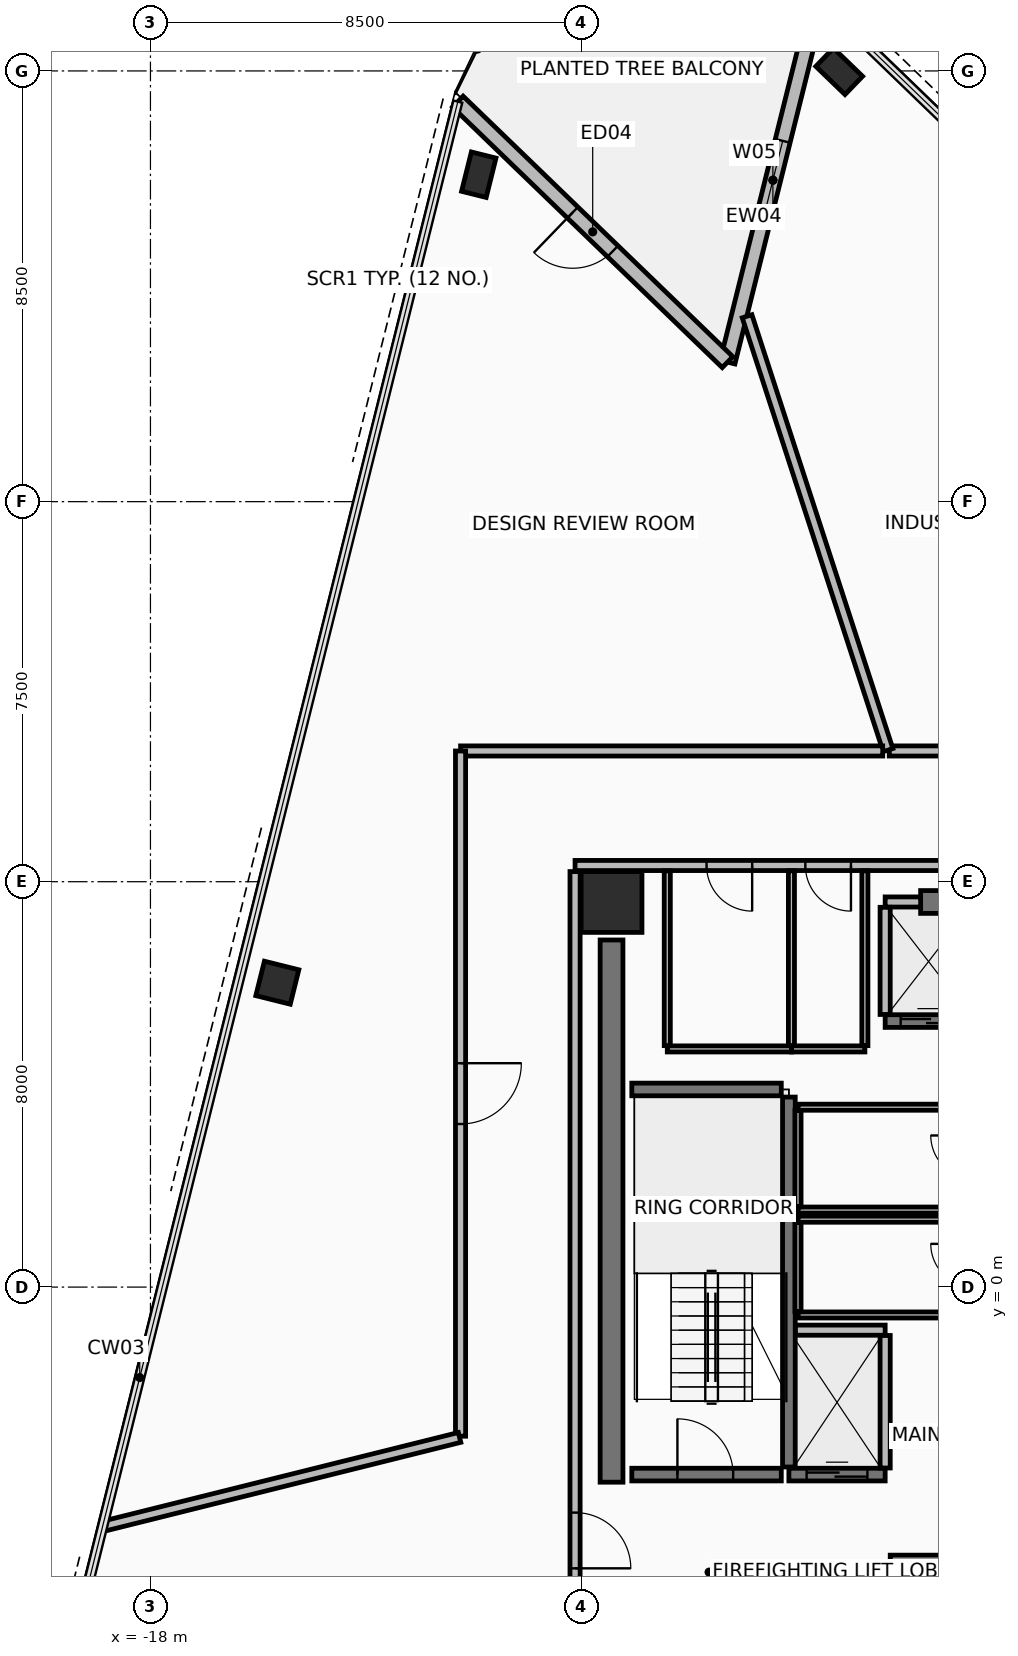
"""IFC4 building model, lengths in metres.
Left out: names, types, materials, properties, quantities, classifications, styles, units other than length and angle.
Written with IfcOpenShell. Run it as: python <this file> out.ifc"""

import sys

from ifc_helpers import new_model, si_unit, direction, frame, frame_2d, origin, origin_2d, place, context, subcontext, project, spatial, rectangle, hollow_rectangle, extrude, element, fill, save


model = new_model("IFC4")
c1 = context("Model", 3, precision=1e-05, world=origin(), true_north=direction((0.0, 1.0)))
c2 = subcontext(c1, "Body", "Model", "MODEL_VIEW")
j1 = project(units=[si_unit("LENGTHUNIT", "METRE"), si_unit("PLANEANGLEUNIT", "RADIAN")], contexts=[c1])
p1 = place(None, origin())
s1 = spatial("IfcSite", under=j1, at=p1, CompositionType="ELEMENT")
p2 = place(p1, origin())
s2 = spatial("IfcBuilding", under=s1, at=p2, CompositionType="ELEMENT")
p3 = place(p2, frame((0.0, 0.0, 100.5)))
s3 = spatial("IfcBuildingStorey", under=s2, at=p3, CompositionType="ELEMENT", Elevation=100.5)
p4 = place(p3, frame((-8.9, 7.6, 0.0), z_axis=(0.0, 0.0, 1.0), x_axis=(1.0, 0.0, 0.0)))
e1 = element("IfcColumn", 1, at=p4, inside=s3, PredefinedType="COLUMN", context=c2, shape_type="SweptSolid", body=[
    extrude(rectangle(XDim=1.2, YDim=1.2, at=origin_2d()), origin(), (0.0, 0.0, 1.0), 3.6),
])
p5 = place(p3, frame((-11.52, 21.952, 0.0), z_axis=(0.0, 0.0, 1.0), x_axis=(0.2419218956, 0.970295726276, 0.0)))
e2 = element("IfcColumn", 2, at=p5, inside=s3, PredefinedType="COLUMN", context=c2, shape_type="SweptSolid", body=[
    extrude(hollow_rectangle(XDim=0.5, YDim=0.8, WallThickness=0.04, at=origin_2d()), origin(), (0.0, 0.0, 1.0), 3.6),
])
p6 = place(p3, frame((-15.496, 6.007, 0.0), z_axis=(0.0, 0.0, 1.0), x_axis=(0.2419218956, 0.970295726276, 0.0)))
e3 = element("IfcColumn", 3, at=p6, inside=s3, PredefinedType="COLUMN", context=c2, shape_type="SweptSolid", body=[
    extrude(hollow_rectangle(XDim=0.7, YDim=0.7, WallThickness=0.04, at=origin_2d()), origin(), (0.0, 0.0, 1.0), 3.6),
])
p7 = place(p3, frame((-4.407, 23.992, 0.0), z_axis=(0.0, 0.0, 1.0), x_axis=(-0.719339800339, 0.694658370459, 0.0)))
e4 = element("IfcColumn", 4, at=p7, inside=s3, PredefinedType="COLUMN", context=c2, shape_type="SweptSolid", body=[
    extrude(hollow_rectangle(XDim=0.5, YDim=0.8, WallThickness=0.04, at=origin_2d()), origin(), (0.0, 0.0, 1.0), 3.6),
])
p8 = place(p3, frame((-4.82, 25.434, 0.0), z_axis=(0.0, 0.0, 1.0), x_axis=(-0.241930078207, -0.970293686086, 0.0)))
e5 = element("IfcWall", 5, at=p8, inside=s3, PredefinedType="STANDARD", context=c2, shape_type="SweptSolid", body=[
    extrude(rectangle(XDim=7.4, YDim=0.3, at=frame_2d((3.7, 0.0))), origin(), (0.0, 0.0, 1.0), 2.605),
])
p9 = place(p8, frame((2.9, 0.0, 0.25)))
e6 = element("IfcOpeningElement", 6, at=p9, cuts=e5, PredefinedType="OPENING", context=c2, shape_type="SweptSolid", body=[
    extrude(rectangle(XDim=1.6, YDim=2.2, at=frame_2d((0.8, 1.1))), frame((0.0, 0.16, 0.0), z_axis=(0.0, -1.0, 0.0), x_axis=(1.0, 0.0, 0.0)), (0.0, 0.0, 1.0), 0.32),
])
p10 = place(p3, frame((-6.611, 18.254, 0.0), z_axis=(0.0, 0.0, 1.0), x_axis=(-0.719321869339, 0.694676938073, 0.0)))
e7 = element("IfcWall", 7, at=p10, inside=s3, PredefinedType="STANDARD", context=c2, shape_type="SweptSolid", body=[
    extrude(rectangle(XDim=7.4, YDim=0.3, at=frame_2d((3.7, 0.0))), origin(), (0.0, 0.0, 1.0), 2.605),
])
p11 = place(p10, frame((3.15, 0.0, 0.0)))
e8 = element("IfcOpeningElement", 8, at=p11, cuts=e7, PredefinedType="OPENING", context=c2, shape_type="SweptSolid", body=[
    extrude(rectangle(XDim=1.1, YDim=2.2, at=frame_2d((0.55, 1.1))), frame((0.0, 0.16, 0.0), z_axis=(0.0, -1.0, 0.0), x_axis=(1.0, 0.0, 0.0)), (0.0, 0.0, 1.0), 0.32),
])
p12 = place(p3, frame((-2.8, 7.6, 0.0), z_axis=(0.0, 0.0, 1.0), x_axis=(1.0, 0.0, 0.0)))
e9 = element("IfcWall", 9, at=p12, inside=s3, PredefinedType="SHEAR", context=c2, shape_type="SweptSolid", body=[
    extrude(rectangle(XDim=5.38, YDim=0.45, at=frame_2d((2.69, 0.0))), origin(), (0.0, 0.0, 1.0), 3.41),
])
p13 = place(p3, frame((-8.9, -3.85, 0.0), z_axis=(0.0, 0.0, 1.0), x_axis=(0.0, 1.0, 0.0)))
e10 = element("IfcWall", 10, at=p13, inside=s3, PredefinedType="SHEAR", context=c2, shape_type="SweptSolid", body=[
    extrude(rectangle(XDim=10.7, YDim=0.45, at=frame_2d((5.35, 0.0))), origin(), (0.0, 0.0, 1.0), 3.41),
])
p14 = place(p3, frame((9.62, 8.32, 0.0), z_axis=(0.0, 0.0, 1.0), x_axis=(-1.0, 0.0, 0.0)))
e11 = element("IfcWall", 11, at=p14, inside=s3, PredefinedType="PARTITIONING", context=c2, shape_type="SweptSolid", body=[
    extrude(rectangle(XDim=19.24, YDim=0.2, at=frame_2d((9.62, 0.0))), origin(), (0.0, 0.0, 1.0), 2.755),
])
p15 = place(p14, frame((15.745, 0.0, 0.0)))
e12 = element("IfcOpeningElement", 12, at=p15, cuts=e11, PredefinedType="OPENING", context=c2, shape_type="SweptSolid", body=[
    extrude(rectangle(XDim=0.9, YDim=2.1, at=frame_2d((0.45, 1.05))), frame((0.0, 0.11, 0.0), z_axis=(0.0, -1.0, 0.0), x_axis=(1.0, 0.0, 0.0)), (0.0, 0.0, 1.0), 0.22),
])
p16 = place(p14, frame((13.795, 0.0, 0.0)))
e13 = element("IfcOpeningElement", 13, at=p16, cuts=e11, PredefinedType="OPENING", context=c2, shape_type="SweptSolid", body=[
    extrude(rectangle(XDim=0.9, YDim=2.1, at=frame_2d((0.45, 1.05))), frame((0.0, 0.11, 0.0), z_axis=(0.0, -1.0, 0.0), x_axis=(1.0, 0.0, 0.0)), (0.0, 0.0, 1.0), 0.22),
])
p17 = place(p3, frame((-9.62, 8.2, 0.0), z_axis=(0.0, 0.0, 1.0), x_axis=(0.0, -1.0, 0.0)))
e14 = element("IfcWall", 14, at=p17, inside=s3, PredefinedType="PARTITIONING", context=c2, shape_type="SweptSolid", body=[
    extrude(rectangle(XDim=16.4, YDim=0.2, at=frame_2d((8.2, 0.0))), origin(), (0.0, 0.0, 1.0), 2.805),
])
p18 = place(p17, frame((12.65, 0.0, 0.0)))
e15 = element("IfcOpeningElement", 15, at=p18, cuts=e14, PredefinedType="OPENING", context=c2, shape_type="SweptSolid", body=[
    extrude(rectangle(XDim=1.1, YDim=2.15, at=frame_2d((0.55, 1.075))), frame((0.0, 0.11, 0.0), z_axis=(0.0, -1.0, 0.0), x_axis=(1.0, 0.0, 0.0)), (0.0, 0.0, 1.0), 0.22),
])
p19 = place(p3, frame((-5.4, -3.55, 0.0), z_axis=(0.0, 0.0, 1.0), x_axis=(0.0, 1.0, 0.0)))
e16 = element("IfcWall", 16, at=p19, inside=s3, PredefinedType="SHEAR", context=c2, shape_type="SweptSolid", body=[
    extrude(rectangle(XDim=7.3, YDim=0.25, at=frame_2d((3.65, 0.0))), origin(), (0.0, 0.0, 1.0), 3.41),
])
p20 = place(p3, frame((-8.5, -3.7, 0.0), z_axis=(0.0, 0.0, 1.0), x_axis=(1.0, 0.0, 0.0)))
e17 = element("IfcWall", 17, at=p20, inside=s3, PredefinedType="SHEAR", context=c2, shape_type="SweptSolid", body=[
    extrude(rectangle(XDim=2.95, YDim=0.25, at=frame_2d((1.475, 0.0))), origin(), (0.0, 0.0, 1.0), 3.41),
])
p21 = place(p20, frame((0.9, 0.0, 0.0)))
e18 = element("IfcOpeningElement", 18, at=p21, cuts=e17, PredefinedType="OPENING", context=c2, shape_type="SweptSolid", body=[
    extrude(rectangle(XDim=1.1, YDim=2.15, at=frame_2d((0.55, 1.075))), frame((0.0, 0.135, 0.0), z_axis=(0.0, -1.0, 0.0), x_axis=(1.0, 0.0, 0.0)), (0.0, 0.0, 1.0), 0.27),
])
p22 = place(p3, frame((-8.5, 3.9, 0.0), z_axis=(0.0, 0.0, 1.0), x_axis=(1.0, 0.0, 0.0)))
e19 = element("IfcWall", 19, at=p22, inside=s3, PredefinedType="SHEAR", context=c2, shape_type="SweptSolid", body=[
    extrude(rectangle(XDim=2.95, YDim=0.25, at=frame_2d((1.475, 0.0))), origin(), (0.0, 0.0, 1.0), 3.41),
])
p23 = place(p3, frame((-3.5, 5.25, 0.0), z_axis=(0.0, 0.0, 1.0), x_axis=(1.0, 0.0, 0.0)))
e20 = element("IfcWall", 20, at=p23, inside=s3, PredefinedType="SHEAR", context=c2, shape_type="SweptSolid", body=[
    extrude(rectangle(XDim=1.712, YDim=0.25, at=frame_2d((0.856, 0.0))), origin(), (0.0, 0.0, 1.0), 3.41),
])
p24 = place(p23, frame((0.306, 0.0, 0.0)))
e21 = element("IfcOpeningElement", 21, at=p24, cuts=e20, PredefinedType="OPENING", context=c2, shape_type="SweptSolid", body=[
    extrude(rectangle(XDim=1.1, YDim=2.2, at=frame_2d((0.55, 1.1))), frame((0.0, 0.135, 0.0), z_axis=(0.0, -1.0, 0.0), x_axis=(1.0, 0.0, 0.0)), (0.0, 0.0, 1.0), 0.27),
])
p25 = place(p3, frame((-3.5, 7.6, 0.0), z_axis=(0.0, 0.0, 1.0), x_axis=(1.0, 0.0, 0.0)))
e22 = element("IfcWall", 22, at=p25, inside=s3, PredefinedType="PARTITIONING", context=c2, shape_type="SweptSolid", body=[
    extrude(rectangle(XDim=0.7, YDim=0.2, at=frame_2d((0.35, 0.0))), origin(), (0.0, 0.0, 1.0), 2.605),
])
p26 = place(p3, frame((-3.5, 5.38, 0.0), z_axis=(0.0, 0.0, 1.0), x_axis=(0.0, 1.0, 0.0)))
e23 = element("IfcWall", 23, at=p26, inside=s3, PredefinedType="PARTITIONING", context=c2, shape_type="SweptSolid", body=[
    extrude(rectangle(XDim=2.115, YDim=0.2, at=frame_2d((1.058, 0.0))), origin(), (0.0, 0.0, 1.0), 2.605),
])
p27 = place(p3, frame((-5.4, -3.7, 0.0), z_axis=(0.0, 0.0, 1.0), x_axis=(1.0, 0.0, 0.0)))
e24 = element("IfcWall", 24, at=p27, inside=s3, PredefinedType="SHEAR", context=c2, shape_type="SweptSolid", body=[
    extrude(rectangle(XDim=1.9, YDim=0.25, at=frame_2d((0.95, 0.0))), origin(), (0.0, 0.0, 1.0), 3.41),
])
p28 = place(p27, frame((0.35, 0.0, 0.0)))
e25 = element("IfcOpeningElement", 25, at=p28, cuts=e24, PredefinedType="OPENING", context=c2, shape_type="SweptSolid", body=[
    extrude(rectangle(XDim=1.2, YDim=2.2, at=frame_2d((0.6, 1.1))), frame((0.0, 0.135, 0.0), z_axis=(0.0, -1.0, 0.0), x_axis=(1.0, 0.0, 0.0)), (0.0, 0.0, 1.0), 0.27),
])
p29 = place(p3, frame((-5.27, -0.85, 0.0), z_axis=(0.0, 0.0, 1.0), x_axis=(1.0, 0.0, 0.0)))
e26 = element("IfcWall", 26, at=p29, inside=s3, PredefinedType="PARTITIONING", context=c2, shape_type="SweptSolid", body=[
    extrude(rectangle(XDim=1.77, YDim=0.2, at=frame_2d((0.885, 0.0))), origin(), (0.0, 0.0, 1.0), 3.41),
])
p30 = place(p3, frame((-3.5, -3.57, 0.0), z_axis=(0.0, 0.0, 1.0), x_axis=(0.0, 1.0, 0.0)))
e27 = element("IfcWall", 27, at=p30, inside=s3, PredefinedType="PARTITIONING", context=c2, shape_type="SweptSolid", body=[
    extrude(rectangle(XDim=2.615, YDim=0.2, at=frame_2d((1.308, 0.0))), origin(), (0.0, 0.0, 1.0), 3.41),
])
p31 = place(p3, frame((-5.22, 1.52, 0.0), z_axis=(0.0, 0.0, 1.0), x_axis=(1.0, 0.0, 0.0)))
e28 = element("IfcWall", 28, at=p31, inside=s3, PredefinedType="PARTITIONING", context=c2, shape_type="SweptSolid", body=[
    extrude(rectangle(XDim=3.47, YDim=0.12, at=frame_2d((1.735, 0.0))), origin(), (0.0, 0.0, 1.0), 3.41),
])
p32 = place(p3, frame((-1.815, 3.55, 0.0), z_axis=(0.0, 0.0, 1.0), x_axis=(-1.0, 0.0, 0.0)))
e29 = element("IfcWall", 29, at=p32, inside=s3, PredefinedType="PARTITIONING", context=c2, shape_type="SweptSolid", body=[
    extrude(rectangle(XDim=3.405, YDim=0.12, at=frame_2d((1.703, 0.0))), origin(), (0.0, 0.0, 1.0), 3.41),
])
p33 = place(p3, frame((-5.22, 3.485, 0.0), z_axis=(0.0, 0.0, 1.0), x_axis=(0.0, -1.0, 0.0)))
e30 = element("IfcWall", 30, at=p33, inside=s3, PredefinedType="PARTITIONING", context=c2, shape_type="SweptSolid", body=[
    extrude(rectangle(XDim=1.9, YDim=0.12, at=frame_2d((0.95, 0.0))), origin(), (0.0, 0.0, 1.0), 3.41),
])
p34 = place(p3, frame((-5.22, -0.55, 0.0), z_axis=(0.0, 0.0, 1.0), x_axis=(1.0, 0.0, 0.0)))
e31 = element("IfcWall", 31, at=p34, inside=s3, PredefinedType="PARTITIONING", context=c2, shape_type="SweptSolid", body=[
    extrude(rectangle(XDim=3.47, YDim=0.12, at=frame_2d((1.735, 0.0))), origin(), (0.0, 0.0, 1.0), 3.41),
])
p35 = place(p3, frame((-1.815, 1.34, 0.0), z_axis=(0.0, 0.0, 1.0), x_axis=(-1.0, 0.0, 0.0)))
e32 = element("IfcWall", 32, at=p35, inside=s3, PredefinedType="PARTITIONING", context=c2, shape_type="SweptSolid", body=[
    extrude(rectangle(XDim=3.405, YDim=0.12, at=frame_2d((1.703, 0.0))), origin(), (0.0, 0.0, 1.0), 3.41),
])
p36 = place(p3, frame((-5.22, 1.275, 0.0), z_axis=(0.0, 0.0, 1.0), x_axis=(0.0, -1.0, 0.0)))
e33 = element("IfcWall", 33, at=p36, inside=s3, PredefinedType="PARTITIONING", context=c2, shape_type="SweptSolid", body=[
    extrude(rectangle(XDim=1.76, YDim=0.12, at=frame_2d((0.88, 0.0))), origin(), (0.0, 0.0, 1.0), 3.41),
])
p37 = place(p3, frame((2.135, -5.35, 0.0), z_axis=(0.0, 0.0, 1.0), x_axis=(-1.0, 0.0, 0.0)))
e34 = element("IfcWall", 34, at=p37, inside=s3, PredefinedType="PARTITIONING", context=c2, shape_type="SweptSolid", body=[
    extrude(rectangle(XDim=5.535, YDim=0.12, at=frame_2d((2.768, 0.0))), origin(), (0.0, 0.0, 1.0), 2.605),
])
p38 = place(p3, frame((-3.4, -5.415, 0.0), z_axis=(0.0, 0.0, 1.0), x_axis=(0.0, -1.0, 0.0)))
e35 = element("IfcWall", 35, at=p38, inside=s3, PredefinedType="PARTITIONING", context=c2, shape_type="SweptSolid", body=[
    extrude(rectangle(XDim=2.8, YDim=0.12, at=frame_2d((1.4, 0.0))), origin(), (0.0, 0.0, 1.0), 2.605),
])
p39 = place(p3, frame((-7.8, 4.7, 0.0), z_axis=(0.0, 0.0, 1.0), x_axis=(1.0, 0.0, 0.0)))
e36 = element("IfcWall", 36, at=p39, inside=s3, PredefinedType="PARTITIONING", context=c2, shape_type="SweptSolid", body=[
    extrude(rectangle(XDim=2.45, YDim=0.12, at=frame_2d((1.225, 0.0))), origin(), (0.0, 0.0, 1.0), 3.41),
])
for number, where, z_axis, x_axis in (
    (37, (-5.35, 4.765, 0.0), (0.0, 0.0, 1.0), (0.0, 1.0, 0.0)),
    (38, (-7.8, 8.215, 0.0), (0.0, 0.0, 1.0), (0.0, -1.0, 0.0)),
):
    element("IfcWall", number, at=place(p3, frame(where, z_axis=z_axis, x_axis=x_axis)), inside=s3, PredefinedType="PARTITIONING", context=c2, shape_type="SweptSolid", body=[
        extrude(rectangle(XDim=3.45, YDim=0.12, at=frame_2d((1.725, 0.0))), origin(), (0.0, 0.0, 1.0), 2.605),
    ])
p40 = place(p3, frame((-5.35, 4.7, 0.0), z_axis=(0.0, 0.0, 1.0), x_axis=(1.0, 0.0, 0.0)))
e39 = element("IfcWall", 39, at=p40, inside=s3, PredefinedType="PARTITIONING", context=c2, shape_type="SweptSolid", body=[
    extrude(rectangle(XDim=1.45, YDim=0.12, at=frame_2d((0.725, 0.0))), origin(), (0.0, 0.0, 1.0), 3.41),
])
p41 = place(p3, frame((-3.9, 4.765, 0.0), z_axis=(0.0, 0.0, 1.0), x_axis=(0.0, 1.0, 0.0)))
e40 = element("IfcWall", 40, at=p41, inside=s3, PredefinedType="PARTITIONING", context=c2, shape_type="SweptSolid", body=[
    extrude(rectangle(XDim=3.45, YDim=0.12, at=frame_2d((1.725, 0.0))), origin(), (0.0, 0.0, 1.0), 2.605),
])
p42 = place(p3, frame((10.561, 10.58, 0.0), z_axis=(0.0, 0.0, 1.0), x_axis=(-1.0, 0.0, 0.0)))
e41 = element("IfcWall", 41, at=p42, inside=s3, PredefinedType="PARTITIONING", context=c2, shape_type="SweptSolid", body=[
    extrude(rectangle(XDim=13.981, YDim=0.2, at=frame_2d((6.99, 0.0))), origin(), (0.0, 0.0, 1.0), 2.605),
])
p43 = place(p42, frame((6.49, 0.0, 0.0)))
e42 = element("IfcOpeningElement", 42, at=p43, cuts=e41, PredefinedType="OPENING", context=c2, shape_type="SweptSolid", body=[
    extrude(rectangle(XDim=1.0, YDim=2.15, at=frame_2d((0.5, 1.075))), frame((0.0, 0.11, 0.0), z_axis=(0.0, -1.0, 0.0), x_axis=(1.0, 0.0, 0.0)), (0.0, 0.0, 1.0), 0.22),
])
p44 = place(p3, frame((-3.443, 10.597, 0.0), z_axis=(0.0, 0.0, 1.0), x_axis=(-0.309010029932, 0.951058779152, 0.0)))
e43 = element("IfcWall", 43, at=p44, inside=s3, PredefinedType="PARTITIONING", context=c2, shape_type="SweptSolid", body=[
    extrude(rectangle(XDim=9.002, YDim=0.2, at=frame_2d((4.501, 0.0))), origin(), (0.0, 0.0, 1.0), 2.805),
])
p45 = place(p3, frame((-3.548, 10.58, 0.0), z_axis=(0.0, 0.0, 1.0), x_axis=(-1.0, 0.0, 0.0)))
e44 = element("IfcWall", 44, at=p45, inside=s3, PredefinedType="PARTITIONING", context=c2, shape_type="SweptSolid", body=[
    extrude(rectangle(XDim=8.331, YDim=0.2, at=frame_2d((4.166, 0.0))), origin(), (0.0, 0.0, 1.0), 2.755),
])
p46 = place(p3, frame((-11.88, 10.579, 0.0), z_axis=(0.0, 0.0, 1.0), x_axis=(0.0, -1.0, 0.0)))
e45 = element("IfcWall", 45, at=p46, inside=s3, PredefinedType="PARTITIONING", context=c2, shape_type="SweptSolid", body=[
    extrude(rectangle(XDim=13.522, YDim=0.2, at=frame_2d((6.761, 0.0))), origin(), (0.0, 0.0, 1.0), 2.805),
])
p47 = place(p46, frame((6.161, 0.0, 0.0)))
e46 = element("IfcOpeningElement", 46, at=p47, cuts=e45, PredefinedType="OPENING", context=c2, shape_type="SweptSolid", body=[
    extrude(rectangle(XDim=1.2, YDim=2.15, at=frame_2d((0.6, 1.075))), frame((0.0, 0.11, 0.0), z_axis=(0.0, -1.0, 0.0), x_axis=(1.0, 0.0, 0.0)), (0.0, 0.0, 1.0), 0.22),
])
p48 = place(p3, frame((-11.899, -2.967, 0.0), z_axis=(0.0, 0.0, 1.0), x_axis=(-0.970294606892, -0.241926385161, 0.0)))
e47 = element("IfcWall", 47, at=p48, inside=s3, PredefinedType="PARTITIONING", context=c2, shape_type="SweptSolid", body=[
    extrude(rectangle(XDim=7.261, YDim=0.2, at=frame_2d((3.63, 0.0))), origin(), (0.0, 0.0, 1.0), 2.605),
])
p49 = place(p11, frame((1.1, 0.0, 0.0), z_axis=(0.0, 0.0, 1.0), x_axis=(-1.0, 0.0, 0.0)))
e48 = element("IfcDoor", 48, at=p49, inside=s3, OperationType="SINGLE_SWING_LEFT", PredefinedType="DOOR", context=c2, shape_type="SweptSolid", body=[
    extrude(rectangle(XDim=1.1, YDim=2.2, at=frame_2d((0.55, 1.1))), frame((0.0, 0.025, 0.0), z_axis=(0.0, -1.0, 0.0), x_axis=(1.0, 0.0, 0.0)), (0.0, 0.0, 1.0), 0.05),
])
fill(e8, e48)
p50 = place(p9, origin())
e49 = element("IfcWindow", 49, at=p50, inside=s3, PartitioningType="SINGLE_PANEL", PredefinedType="WINDOW", context=c2, shape_type="SweptSolid", body=[
    extrude(rectangle(XDim=1.6, YDim=2.2, at=frame_2d((0.8, 1.1))), frame((0.0, 0.03, 0.0), z_axis=(0.0, -1.0, 0.0), x_axis=(1.0, 0.0, 0.0)), (0.0, 0.0, 1.0), 0.06),
])
fill(e6, e49)
p51 = place(p18, frame((1.1, 0.0, 0.0), z_axis=(0.0, 0.0, 1.0), x_axis=(-1.0, 0.0, 0.0)))
e50 = element("IfcDoor", 50, at=p51, inside=s3, OperationType="SINGLE_SWING_LEFT", PredefinedType="DOOR", context=c2, shape_type="SweptSolid", body=[
    extrude(rectangle(XDim=1.1, YDim=2.15, at=frame_2d((0.55, 1.075))), frame((0.0, 0.025, 0.0), z_axis=(0.0, -1.0, 0.0), x_axis=(1.0, 0.0, 0.0)), (0.0, 0.0, 1.0), 0.05),
])
fill(e15, e50)
p52 = place(p21, origin())
e51 = element("IfcDoor", 51, at=p52, inside=s3, OperationType="SINGLE_SWING_LEFT", PredefinedType="DOOR", context=c2, shape_type="SweptSolid", body=[
    extrude(rectangle(XDim=1.1, YDim=2.15, at=frame_2d((0.55, 1.075))), frame((0.0, 0.025, 0.0), z_axis=(0.0, -1.0, 0.0), x_axis=(1.0, 0.0, 0.0)), (0.0, 0.0, 1.0), 0.05),
])
fill(e18, e51)
p53 = place(p24, origin())
e52 = element("IfcDoor", 52, at=p53, inside=s3, OperationType="SLIDING_TO_LEFT", PredefinedType="DOOR", context=c2, shape_type="SweptSolid", body=[
    extrude(rectangle(XDim=1.1, YDim=2.2, at=frame_2d((0.55, 1.1))), frame((0.0, 0.025, 0.0), z_axis=(0.0, -1.0, 0.0), x_axis=(1.0, 0.0, 0.0)), (0.0, 0.0, 1.0), 0.05),
])
fill(e21, e52)
p54 = place(p28, origin())
e53 = element("IfcDoor", 53, at=p54, inside=s3, OperationType="SLIDING_TO_RIGHT", PredefinedType="DOOR", context=c2, shape_type="SweptSolid", body=[
    extrude(rectangle(XDim=1.2, YDim=2.2, at=frame_2d((0.6, 1.1))), frame((0.0, 0.025, 0.0), z_axis=(0.0, -1.0, 0.0), x_axis=(1.0, 0.0, 0.0)), (0.0, 0.0, 1.0), 0.05),
])
fill(e25, e53)
p55 = place(p15, origin())
e54 = element("IfcDoor", 54, at=p55, inside=s3, OperationType="SINGLE_SWING_LEFT", PredefinedType="DOOR", context=c2, shape_type="SweptSolid", body=[
    extrude(rectangle(XDim=0.9, YDim=2.1, at=frame_2d((0.45, 1.05))), frame((0.0, 0.025, 0.0), z_axis=(0.0, -1.0, 0.0), x_axis=(1.0, 0.0, 0.0)), (0.0, 0.0, 1.0), 0.05),
])
fill(e12, e54)
p56 = place(p16, origin())
e55 = element("IfcDoor", 55, at=p56, inside=s3, OperationType="SINGLE_SWING_LEFT", PredefinedType="DOOR", context=c2, shape_type="SweptSolid", body=[
    extrude(rectangle(XDim=0.9, YDim=2.1, at=frame_2d((0.45, 1.05))), frame((0.0, 0.025, 0.0), z_axis=(0.0, -1.0, 0.0), x_axis=(1.0, 0.0, 0.0)), (0.0, 0.0, 1.0), 0.05),
])
fill(e13, e55)
p57 = place(p47, origin())
e56 = element("IfcDoor", 56, at=p57, inside=s3, OperationType="SINGLE_SWING_LEFT", PredefinedType="DOOR", context=c2, shape_type="SweptSolid", body=[
    extrude(rectangle(XDim=1.2, YDim=2.15, at=frame_2d((0.6, 1.075))), frame((0.0, 0.025, 0.0), z_axis=(0.0, -1.0, 0.0), x_axis=(1.0, 0.0, 0.0)), (0.0, 0.0, 1.0), 0.05),
])
fill(e46, e56)
save(model, sys.argv[1])
